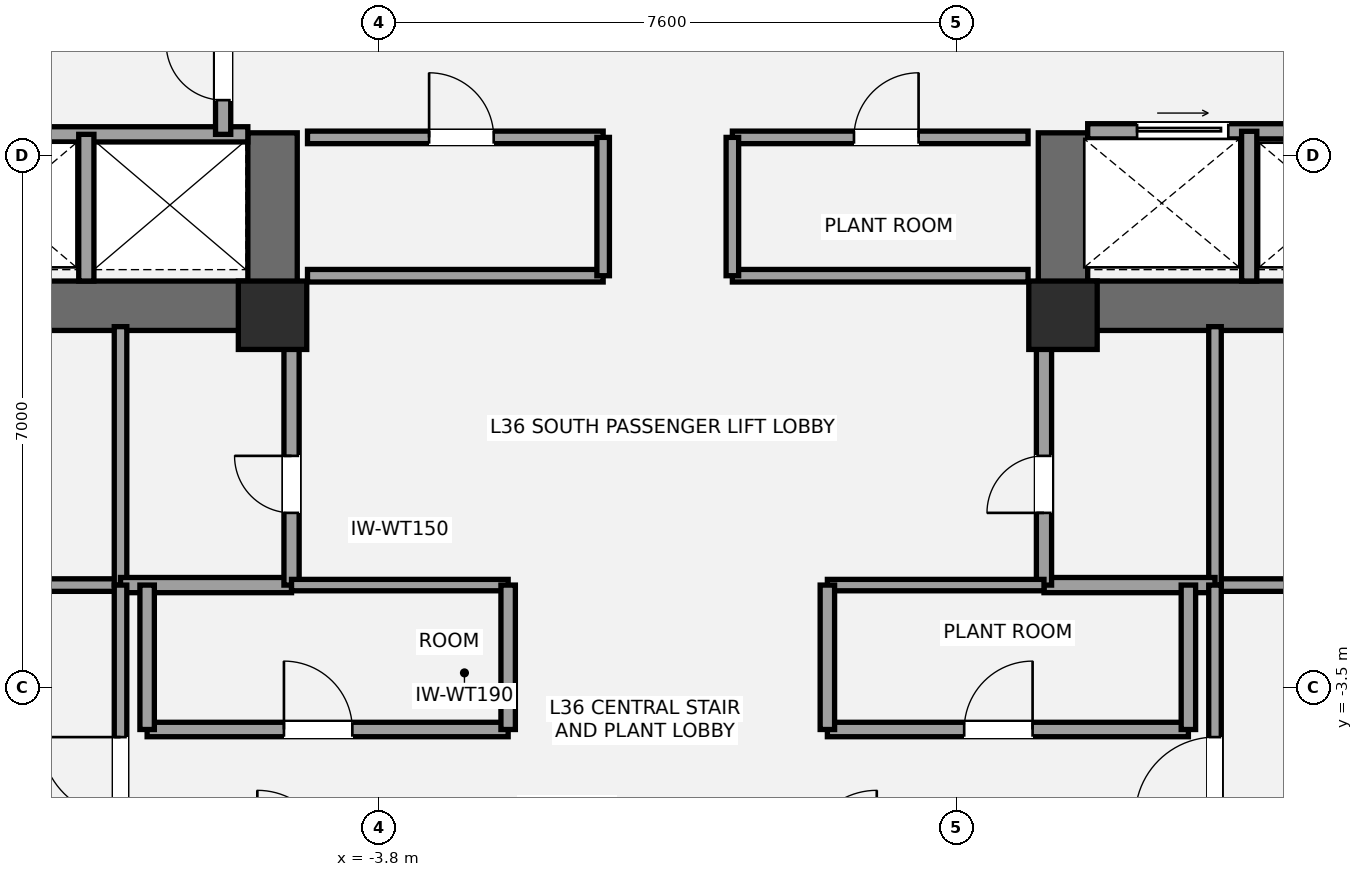
"""IFC4 building model, lengths in metres.
Left out: names, types, materials, properties, quantities, classifications, styles, units other than length and angle.
Written with IfcOpenShell. Run it as: python <this file> out.ifc"""

import sys

from ifc_helpers import new_model, si_unit, direction, frame, frame_2d, origin, origin_2d, place, context, subcontext, project, spatial, rectangle, extrude, element, fill, save


model = new_model("IFC4")
c1 = context("Model", 3, precision=1e-05, world=origin(), true_north=direction((0.0, 1.0)))
c2 = subcontext(c1, "Body", "Model", "MODEL_VIEW")
j1 = project(units=[si_unit("LENGTHUNIT", "METRE"), si_unit("PLANEANGLEUNIT", "RADIAN")], contexts=[c1])
p1 = place(None, origin())
s1 = spatial("IfcSite", under=j1, at=p1, CompositionType="ELEMENT")
p2 = place(p1, origin())
s2 = spatial("IfcBuilding", under=s1, at=p2, CompositionType="ELEMENT")
p3 = place(p2, frame((0.0, 0.0, 135.1)))
s3 = spatial("IfcBuildingStorey", under=s2, at=p3, CompositionType="ELEMENT", Elevation=135.1)
p4 = place(p3, frame((-4.875, 1.525, 0.0), z_axis=(0.0, 0.0, 1.0), x_axis=(-1.0, 0.0, 0.0)))
e1 = element("IfcWall", 1, at=p4, inside=s3, PredefinedType="SHEAR", context=c2, shape_type="SweptSolid", body=[
    extrude(rectangle(XDim=8.925, YDim=0.65, at=frame_2d((4.462, 0.0))), origin(), (0.0, 0.0, 1.0), 4.5),
])
p5 = place(p4, frame((5.305, 0.0, 0.0)))
e2 = element("IfcOpeningElement", 2, at=p5, cuts=e1, PredefinedType="OPENING", context=c2, shape_type="SweptSolid", body=[
    extrude(rectangle(XDim=1.05, YDim=2.15, at=frame_2d((0.525, 1.075))), frame((0.0, 0.335, 0.0), z_axis=(0.0, -1.0, 0.0), x_axis=(1.0, 0.0, 0.0)), (0.0, 0.0, 1.0), 0.67),
])
p6 = place(p4, frame((3.755, 0.0, 0.0)))
e3 = element("IfcOpeningElement", 3, at=p6, cuts=e1, PredefinedType="OPENING", context=c2, shape_type="SweptSolid", body=[
    extrude(rectangle(XDim=1.1, YDim=2.2, at=frame_2d((0.55, 1.1))), frame((0.0, 0.335, 0.0), z_axis=(0.0, -1.0, 0.0), x_axis=(1.0, 0.0, 0.0)), (0.0, 0.0, 1.0), 0.67),
])
p7 = place(p3, frame((-5.2, 1.2, 0.0), z_axis=(0.0, 0.0, 1.0), x_axis=(0.0, 1.0, 0.0)))
e4 = element("IfcWall", 4, at=p7, inside=s3, PredefinedType="SHEAR", context=c2, shape_type="SweptSolid", body=[
    extrude(rectangle(XDim=2.6, YDim=0.65, at=frame_2d((1.3, 0.0))), origin(), (0.0, 0.0, 1.0), 4.5),
])
p8 = place(p3, frame((13.8, 1.525, 0.0), z_axis=(0.0, 0.0, 1.0), x_axis=(-1.0, 0.0, 0.0)))
e5 = element("IfcWall", 5, at=p8, inside=s3, PredefinedType="SHEAR", context=c2, shape_type="SweptSolid", body=[
    extrude(rectangle(XDim=8.925, YDim=0.65, at=frame_2d((4.462, 0.0))), origin(), (0.0, 0.0, 1.0), 4.5),
])
p9 = place(p8, frame((2.57, 0.0, 0.0)))
e6 = element("IfcOpeningElement", 6, at=p9, cuts=e5, PredefinedType="OPENING", context=c2, shape_type="SweptSolid", body=[
    extrude(rectangle(XDim=1.05, YDim=2.15, at=frame_2d((0.525, 1.075))), frame((0.0, 0.335, 0.0), z_axis=(0.0, -1.0, 0.0), x_axis=(1.0, 0.0, 0.0)), (0.0, 0.0, 1.0), 0.67),
])
p10 = place(p8, frame((4.45, 0.0, 0.0)))
e7 = element("IfcOpeningElement", 7, at=p10, cuts=e5, PredefinedType="OPENING", context=c2, shape_type="SweptSolid", body=[
    extrude(rectangle(XDim=1.1, YDim=2.2, at=frame_2d((0.55, 1.1))), frame((0.0, 0.335, 0.0), z_axis=(0.0, -1.0, 0.0), x_axis=(1.0, 0.0, 0.0)), (0.0, 0.0, 1.0), 0.67),
])
p11 = place(p3, frame((5.2, 1.2, 0.0), z_axis=(0.0, 0.0, 1.0), x_axis=(0.0, 1.0, 0.0)))
e8 = element("IfcWall", 8, at=p11, inside=s3, PredefinedType="SHEAR", context=c2, shape_type="SweptSolid", body=[
    extrude(rectangle(XDim=2.6, YDim=0.65, at=frame_2d((1.3, 0.0))), origin(), (0.0, 0.0, 1.0), 4.5),
])
for number, where, z_axis, x_axis in (
    (9, (-5.2, 1.4, 0.0), (0.0, 0.0, 1.0), (1.0, 0.0, 0.0)),
    (10, (5.2, 1.4, 0.0), (0.0, 0.0, 1.0), (1.0, 0.0, 0.0)),
):
    element("IfcColumn", number, at=place(p3, frame(where, z_axis=z_axis, x_axis=x_axis)), inside=s3, PredefinedType="COLUMN", context=c2, shape_type="SweptSolid", body=[
        extrude(rectangle(XDim=0.9, YDim=0.9, at=origin_2d()), origin(), (0.0, 0.0, 1.0), 4.5),
    ])
p12 = place(p3, frame((-13.45, -2.15, 0.0), z_axis=(0.0, 0.0, 1.0), x_axis=(1.0, 0.0, 0.0)))
e11 = element("IfcWall", 11, at=p12, inside=s3, PredefinedType="PARTITIONING", context=c2, shape_type="SweptSolid", body=[
    extrude(rectangle(XDim=6.25, YDim=0.165, at=frame_2d((3.125, 0.0))), origin(), (0.0, 0.0, 1.0), 4.28),
])
p13 = place(p12, frame((2.6, 0.0, 0.0)))
e12 = element("IfcOpeningElement", 12, at=p13, cuts=e11, PredefinedType="OPENING", context=c2, shape_type="SweptSolid", body=[
    extrude(rectangle(XDim=1.05, YDim=2.15, at=frame_2d((0.525, 1.075))), frame((0.0, 0.093, 0.0), z_axis=(0.0, -1.0, 0.0), x_axis=(1.0, 0.0, 0.0)), (0.0, 0.0, 1.0), 0.185),
])
p14 = place(p3, frame((-7.2, -2.15, 0.0), z_axis=(0.0, 0.0, 1.0), x_axis=(0.0, 1.0, 0.0)))
e13 = element("IfcWall", 13, at=p14, inside=s3, PredefinedType="PARTITIONING", context=c2, shape_type="SweptSolid", body=[
    extrude(rectangle(XDim=3.4, YDim=0.165, at=frame_2d((1.7, 0.0))), origin(), (0.0, 0.0, 1.0), 3.733),
])
p15 = place(p3, frame((-7.2, -2.15, 0.0), z_axis=(0.0, 0.0, 1.0), x_axis=(1.0, 0.0, 0.0)))
e14 = element("IfcWall", 14, at=p15, inside=s3, PredefinedType="SOLIDWALL", context=c2, shape_type="SweptSolid", body=[
    extrude(rectangle(XDim=2.25, YDim=0.2, at=frame_2d((1.125, 0.0))), origin(), (0.0, 0.0, 1.0), 2.47),
])
p16 = place(p3, frame((-4.95, -2.15, 0.0), z_axis=(0.0, 0.0, 1.0), x_axis=(0.0, 1.0, 0.0)))
e15 = element("IfcWall", 15, at=p16, inside=s3, PredefinedType="SOLIDWALL", context=c2, shape_type="SweptSolid", body=[
    extrude(rectangle(XDim=3.4, YDim=0.2, at=frame_2d((1.7, 0.0))), origin(), (0.0, 0.0, 1.0), 2.47),
])
p17 = place(p16, frame((0.95, 0.0, 0.0)))
e16 = element("IfcOpeningElement", 16, at=p17, cuts=e15, PredefinedType="OPENING", context=c2, shape_type="SweptSolid", body=[
    extrude(rectangle(XDim=0.75, YDim=2.1, at=frame_2d((0.375, 1.05))), frame((0.0, 0.11, 0.0), z_axis=(0.0, -1.0, 0.0), x_axis=(1.0, 0.0, 0.0)), (0.0, 0.0, 1.0), 0.22),
])
p18 = place(p3, frame((7.2, -2.15, 0.0), z_axis=(0.0, 0.0, 1.0), x_axis=(1.0, 0.0, 0.0)))
e17 = element("IfcWall", 17, at=p18, inside=s3, PredefinedType="PARTITIONING", context=c2, shape_type="SweptSolid", body=[
    extrude(rectangle(XDim=6.25, YDim=0.165, at=frame_2d((3.125, 0.0))), origin(), (0.0, 0.0, 1.0), 4.28),
])
p19 = place(p18, frame((1.4, 0.0, 0.0)))
e18 = element("IfcOpeningElement", 18, at=p19, cuts=e17, PredefinedType="OPENING", context=c2, shape_type="SweptSolid", body=[
    extrude(rectangle(XDim=1.05, YDim=2.15, at=frame_2d((0.525, 1.075))), frame((0.0, 0.093, 0.0), z_axis=(0.0, -1.0, 0.0), x_axis=(1.0, 0.0, 0.0)), (0.0, 0.0, 1.0), 0.185),
])
p20 = place(p3, frame((7.2, -2.15, 0.0), z_axis=(0.0, 0.0, 1.0), x_axis=(0.0, 1.0, 0.0)))
e19 = element("IfcWall", 19, at=p20, inside=s3, PredefinedType="PARTITIONING", context=c2, shape_type="SweptSolid", body=[
    extrude(rectangle(XDim=3.4, YDim=0.165, at=frame_2d((1.7, 0.0))), origin(), (0.0, 0.0, 1.0), 4.28),
])
p21 = place(p3, frame((4.95, -2.15, 0.0), z_axis=(0.0, 0.0, 1.0), x_axis=(1.0, 0.0, 0.0)))
e20 = element("IfcWall", 20, at=p21, inside=s3, PredefinedType="SOLIDWALL", context=c2, shape_type="SweptSolid", body=[
    extrude(rectangle(XDim=2.25, YDim=0.2, at=frame_2d((1.125, 0.0))), origin(), (0.0, 0.0, 1.0), 2.47),
])
p22 = place(p3, frame((4.95, -2.15, 0.0), z_axis=(0.0, 0.0, 1.0), x_axis=(0.0, 1.0, 0.0)))
e21 = element("IfcWall", 21, at=p22, inside=s3, PredefinedType="SOLIDWALL", context=c2, shape_type="SweptSolid", body=[
    extrude(rectangle(XDim=3.4, YDim=0.2, at=frame_2d((1.7, 0.0))), origin(), (0.0, 0.0, 1.0), 2.47),
])
p23 = place(p22, frame((0.95, 0.0, 0.0)))
e22 = element("IfcOpeningElement", 22, at=p23, cuts=e21, PredefinedType="OPENING", context=c2, shape_type="SweptSolid", body=[
    extrude(rectangle(XDim=0.75, YDim=2.1, at=frame_2d((0.375, 1.05))), frame((0.0, 0.11, 0.0), z_axis=(0.0, -1.0, 0.0), x_axis=(1.0, 0.0, 0.0)), (0.0, 0.0, 1.0), 0.22),
])
p24 = place(p3, frame((-9.78, 3.78, 0.0), z_axis=(0.0, 0.0, 1.0), x_axis=(1.0, 0.0, 0.0)))
e23 = element("IfcWall", 23, at=p24, inside=s3, PredefinedType="SOLIDWALL", context=c2, shape_type="SweptSolid", body=[
    extrude(rectangle(XDim=4.255, YDim=0.2, at=frame_2d((2.127, 0.0))), origin(), (0.0, 0.0, 1.0), 4.28),
])
p25 = place(p3, frame((-7.65, 1.85, 0.0), z_axis=(0.0, 0.0, 1.0), x_axis=(0.0, 1.0, 0.0)))
e24 = element("IfcWall", 24, at=p25, inside=s3, PredefinedType="SOLIDWALL", context=c2, shape_type="SweptSolid", body=[
    extrude(rectangle(XDim=1.93, YDim=0.2, at=frame_2d((0.965, 0.0))), origin(), (0.0, 0.0, 1.0), 4.28),
])
p26 = place(p3, frame((-5.85, 3.78, 0.0), z_axis=(0.0, 0.0, 1.0), x_axis=(0.0, 1.0, 0.0)))
e25 = element("IfcWall", 25, at=p26, inside=s3, PredefinedType="SOLIDWALL", context=c2, shape_type="SweptSolid", body=[
    extrude(rectangle(XDim=1.69, YDim=0.2, at=frame_2d((0.845, 0.0))), origin(), (0.0, 0.0, 1.0), 4.28),
])
p27 = place(p26, frame((0.45, 0.0, 0.0)))
e26 = element("IfcOpeningElement", 26, at=p27, cuts=e25, PredefinedType="OPENING", context=c2, shape_type="SweptSolid", body=[
    extrude(rectangle(XDim=0.75, YDim=2.1, at=frame_2d((0.375, 1.05))), frame((0.0, 0.11, 0.0), z_axis=(0.0, -1.0, 0.0), x_axis=(1.0, 0.0, 0.0)), (0.0, 0.0, 1.0), 0.22),
])
p28 = place(p3, frame((5.525, 3.82, 0.0), z_axis=(0.0, 0.0, 1.0), x_axis=(1.0, 0.0, 0.0)))
e27 = element("IfcWall", 27, at=p28, inside=s3, PredefinedType="SOLIDWALL", context=c2, shape_type="SweptSolid", body=[
    extrude(rectangle(XDim=4.255, YDim=0.2, at=frame_2d((2.127, 0.0))), origin(), (0.0, 0.0, 1.0), 4.28),
])
p29 = place(p28, frame((0.65, 0.0, 0.0)))
e28 = element("IfcOpeningElement", 28, at=p29, cuts=e27, PredefinedType="OPENING", context=c2, shape_type="SweptSolid", body=[
    extrude(rectangle(XDim=1.2, YDim=2.2, at=frame_2d((0.6, 1.1))), frame((0.0, 0.11, 0.0), z_axis=(0.0, -1.0, 0.0), x_axis=(1.0, 0.0, 0.0)), (0.0, 0.0, 1.0), 0.22),
])
p30 = place(p3, frame((7.65, 1.85, 0.0), z_axis=(0.0, 0.0, 1.0), x_axis=(0.0, 1.0, 0.0)))
e29 = element("IfcWall", 29, at=p30, inside=s3, PredefinedType="SOLIDWALL", context=c2, shape_type="SweptSolid", body=[
    extrude(rectangle(XDim=1.97, YDim=0.2, at=frame_2d((0.985, 0.0))), origin(), (0.0, 0.0, 1.0), 4.28),
])
p31 = place(p3, frame((-4.74, 1.92, 0.0), z_axis=(0.0, 0.0, 1.0), x_axis=(1.0, 0.0, 0.0)))
e30 = element("IfcWall", 30, at=p31, inside=s3, PredefinedType="PARTITIONING", context=c2, shape_type="SweptSolid", body=[
    extrude(rectangle(XDim=3.89, YDim=0.165, at=frame_2d((1.945, 0.0))), origin(), (0.0, 0.0, 1.0), 3.42),
])
p32 = place(p3, frame((-4.74, 3.74, 0.0), z_axis=(0.0, 0.0, 1.0), x_axis=(1.0, 0.0, 0.0)))
e31 = element("IfcWall", 31, at=p32, inside=s3, PredefinedType="PARTITIONING", context=c2, shape_type="SweptSolid", body=[
    extrude(rectangle(XDim=3.89, YDim=0.165, at=frame_2d((1.945, 0.0))), origin(), (0.0, 0.0, 1.0), 4.28),
])
p33 = place(p32, frame((1.6, 0.0, 0.0)))
e32 = element("IfcOpeningElement", 32, at=p33, cuts=e31, PredefinedType="OPENING", context=c2, shape_type="SweptSolid", body=[
    extrude(rectangle(XDim=0.85, YDim=2.1, at=frame_2d((0.425, 1.05))), frame((0.0, 0.093, 0.0), z_axis=(0.0, -1.0, 0.0), x_axis=(1.0, 0.0, 0.0)), (0.0, 0.0, 1.0), 0.185),
])
p34 = place(p3, frame((-0.85, 1.92, 0.0), z_axis=(0.0, 0.0, 1.0), x_axis=(0.0, 1.0, 0.0)))
e33 = element("IfcWall", 33, at=p34, inside=s3, PredefinedType="PARTITIONING", context=c2, shape_type="SweptSolid", body=[
    extrude(rectangle(XDim=1.82, YDim=0.165, at=frame_2d((0.91, 0.0))), origin(), (0.0, 0.0, 1.0), 4.28),
])
p35 = place(p3, frame((0.85, 1.92, 0.0), z_axis=(0.0, 0.0, 1.0), x_axis=(1.0, 0.0, 0.0)))
e34 = element("IfcWall", 34, at=p35, inside=s3, PredefinedType="PARTITIONING", context=c2, shape_type="SweptSolid", body=[
    extrude(rectangle(XDim=3.89, YDim=0.165, at=frame_2d((1.945, 0.0))), origin(), (0.0, 0.0, 1.0), 3.42),
])
p36 = place(p3, frame((0.85, 3.74, 0.0), z_axis=(0.0, 0.0, 1.0), x_axis=(1.0, 0.0, 0.0)))
e35 = element("IfcWall", 35, at=p36, inside=s3, PredefinedType="PARTITIONING", context=c2, shape_type="SweptSolid", body=[
    extrude(rectangle(XDim=3.89, YDim=0.165, at=frame_2d((1.945, 0.0))), origin(), (0.0, 0.0, 1.0), 4.28),
])
p37 = place(p36, frame((1.6, 0.0, 0.0)))
e36 = element("IfcOpeningElement", 36, at=p37, cuts=e35, PredefinedType="OPENING", context=c2, shape_type="SweptSolid", body=[
    extrude(rectangle(XDim=0.85, YDim=2.1, at=frame_2d((0.425, 1.05))), frame((0.0, 0.093, 0.0), z_axis=(0.0, -1.0, 0.0), x_axis=(1.0, 0.0, 0.0)), (0.0, 0.0, 1.0), 0.185),
])
p38 = place(p3, frame((0.85, 1.92, 0.0), z_axis=(0.0, 0.0, 1.0), x_axis=(0.0, 1.0, 0.0)))
e37 = element("IfcWall", 37, at=p38, inside=s3, PredefinedType="PARTITIONING", context=c2, shape_type="SweptSolid", body=[
    extrude(rectangle(XDim=1.82, YDim=0.165, at=frame_2d((0.91, 0.0))), origin(), (0.0, 0.0, 1.0), 4.28),
])
p39 = place(p3, frame((-6.85, -4.05, 0.0), z_axis=(0.0, 0.0, 1.0), x_axis=(1.0, 0.0, 0.0)))
e38 = element("IfcWall", 38, at=p39, inside=s3, PredefinedType="PLUMBINGWALL", context=c2, shape_type="SweptSolid", body=[
    extrude(rectangle(XDim=4.75, YDim=0.19, at=frame_2d((2.375, 0.0))), origin(), (0.0, 0.0, 1.0), 2.47),
])
p40 = place(p39, frame((1.8, 0.0, 0.0)))
e39 = element("IfcOpeningElement", 39, at=p40, cuts=e38, PredefinedType="OPENING", context=c2, shape_type="SweptSolid", body=[
    extrude(rectangle(XDim=0.9, YDim=2.1, at=frame_2d((0.45, 1.05))), frame((0.0, 0.105, 0.0), z_axis=(0.0, -1.0, 0.0), x_axis=(1.0, 0.0, 0.0)), (0.0, 0.0, 1.0), 0.21),
])
p41 = place(p3, frame((-4.95, -2.15, 0.0), z_axis=(0.0, 0.0, 1.0), x_axis=(1.0, 0.0, 0.0)))
e40 = element("IfcWall", 40, at=p41, inside=s3, PredefinedType="PLUMBINGWALL", context=c2, shape_type="SweptSolid", body=[
    extrude(rectangle(XDim=2.85, YDim=0.15, at=frame_2d((1.425, 0.0))), origin(), (0.0, 0.0, 1.0), 3.733),
])
p42 = place(p3, frame((-6.85, -4.05, 0.0), z_axis=(0.0, 0.0, 1.0), x_axis=(0.0, 1.0, 0.0)))
e41 = element("IfcWall", 41, at=p42, inside=s3, PredefinedType="PLUMBINGWALL", context=c2, shape_type="SweptSolid", body=[
    extrude(rectangle(XDim=1.9, YDim=0.19, at=frame_2d((0.95, 0.0))), origin(), (0.0, 0.0, 1.0), 4.28),
])
p43 = place(p3, frame((-2.1, -4.05, 0.0), z_axis=(0.0, 0.0, 1.0), x_axis=(0.0, 1.0, 0.0)))
e42 = element("IfcWall", 42, at=p43, inside=s3, PredefinedType="PLUMBINGWALL", context=c2, shape_type="SweptSolid", body=[
    extrude(rectangle(XDim=1.9, YDim=0.19, at=frame_2d((0.95, 0.0))), origin(), (0.0, 0.0, 1.0), 3.733),
])
p44 = place(p3, frame((2.1, -4.05, 0.0), z_axis=(0.0, 0.0, 1.0), x_axis=(1.0, 0.0, 0.0)))
e43 = element("IfcWall", 43, at=p44, inside=s3, PredefinedType="PLUMBINGWALL", context=c2, shape_type="SweptSolid", body=[
    extrude(rectangle(XDim=4.75, YDim=0.19, at=frame_2d((2.375, 0.0))), origin(), (0.0, 0.0, 1.0), 2.47),
])
p45 = place(p44, frame((1.8, 0.0, 0.0)))
e44 = element("IfcOpeningElement", 44, at=p45, cuts=e43, PredefinedType="OPENING", context=c2, shape_type="SweptSolid", body=[
    extrude(rectangle(XDim=0.9, YDim=2.1, at=frame_2d((0.45, 1.05))), frame((0.0, 0.105, 0.0), z_axis=(0.0, -1.0, 0.0), x_axis=(1.0, 0.0, 0.0)), (0.0, 0.0, 1.0), 0.21),
])
p46 = place(p3, frame((2.1, -2.15, 0.0), z_axis=(0.0, 0.0, 1.0), x_axis=(1.0, 0.0, 0.0)))
e45 = element("IfcWall", 45, at=p46, inside=s3, PredefinedType="PLUMBINGWALL", context=c2, shape_type="SweptSolid", body=[
    extrude(rectangle(XDim=2.85, YDim=0.15, at=frame_2d((1.425, 0.0))), origin(), (0.0, 0.0, 1.0), 4.28),
])
for number, where, z_axis, x_axis in (
    (46, (2.1, -4.05, 0.0), (0.0, 0.0, 1.0), (0.0, 1.0, 0.0)),
    (47, (6.85, -4.05, 0.0), (0.0, 0.0, 1.0), (0.0, 1.0, 0.0)),
):
    element("IfcWall", number, at=place(p3, frame(where, z_axis=z_axis, x_axis=x_axis)), inside=s3, PredefinedType="PLUMBINGWALL", context=c2, shape_type="SweptSolid", body=[
        extrude(rectangle(XDim=1.9, YDim=0.19, at=frame_2d((0.95, 0.0))), origin(), (0.0, 0.0, 1.0), 4.28),
    ])
p47 = place(p3, frame((-7.2, -5.8, 0.0), z_axis=(0.0, 0.0, 1.0), x_axis=(0.0, 1.0, 0.0)))
e48 = element("IfcWall", 48, at=p47, inside=s3, PredefinedType="PARTITIONING", context=c2, shape_type="SweptSolid", body=[
    extrude(rectangle(XDim=3.65, YDim=0.165, at=frame_2d((1.825, 0.0))), origin(), (0.0, 0.0, 1.0), 3.733),
])
p48 = place(p47, frame((0.6, 0.0, 0.0)))
e49 = element("IfcOpeningElement", 49, at=p48, cuts=e48, PredefinedType="OPENING", context=c2, shape_type="SweptSolid", body=[
    extrude(rectangle(XDim=1.05, YDim=2.15, at=frame_2d((0.525, 1.075))), frame((0.0, 0.093, 0.0), z_axis=(0.0, -1.0, 0.0), x_axis=(1.0, 0.0, 0.0)), (0.0, 0.0, 1.0), 0.185),
])
p49 = place(p3, frame((7.2, -5.8, 0.0), z_axis=(0.0, 0.0, 1.0), x_axis=(0.0, 1.0, 0.0)))
e50 = element("IfcWall", 50, at=p49, inside=s3, PredefinedType="PARTITIONING", context=c2, shape_type="SweptSolid", body=[
    extrude(rectangle(XDim=3.65, YDim=0.165, at=frame_2d((1.825, 0.0))), origin(), (0.0, 0.0, 1.0), 4.28),
])
p50 = place(p49, frame((0.6, 0.0, 0.0)))
e51 = element("IfcOpeningElement", 51, at=p50, cuts=e50, PredefinedType="OPENING", context=c2, shape_type="SweptSolid", body=[
    extrude(rectangle(XDim=1.05, YDim=2.15, at=frame_2d((0.525, 1.075))), frame((0.0, 0.093, 0.0), z_axis=(0.0, -1.0, 0.0), x_axis=(1.0, 0.0, 0.0)), (0.0, 0.0, 1.0), 0.185),
])
p51 = place(p17, origin())
e52 = element("IfcDoor", 52, at=p51, inside=s3, OperationType="SINGLE_SWING_RIGHT", PredefinedType="DOOR", context=c2, shape_type="SweptSolid", body=[
    extrude(rectangle(XDim=0.75, YDim=2.1, at=frame_2d((0.375, 1.05))), frame((0.0, 0.025, 0.0), z_axis=(0.0, -1.0, 0.0), x_axis=(1.0, 0.0, 0.0)), (0.0, 0.0, 1.0), 0.05),
])
fill(e16, e52)
p52 = place(p23, origin())
e53 = element("IfcDoor", 53, at=p52, inside=s3, OperationType="SINGLE_SWING_LEFT", PredefinedType="DOOR", context=c2, shape_type="SweptSolid", body=[
    extrude(rectangle(XDim=0.75, YDim=2.1, at=frame_2d((0.375, 1.05))), frame((0.0, 0.025, 0.0), z_axis=(0.0, -1.0, 0.0), x_axis=(1.0, 0.0, 0.0)), (0.0, 0.0, 1.0), 0.05),
])
fill(e22, e53)
p53 = place(p27, origin())
e54 = element("IfcDoor", 54, at=p53, inside=s3, OperationType="SINGLE_SWING_RIGHT", PredefinedType="DOOR", context=c2, shape_type="SweptSolid", body=[
    extrude(rectangle(XDim=0.75, YDim=2.1, at=frame_2d((0.375, 1.05))), frame((0.0, 0.025, 0.0), z_axis=(0.0, -1.0, 0.0), x_axis=(1.0, 0.0, 0.0)), (0.0, 0.0, 1.0), 0.05),
])
fill(e26, e54)
p54 = place(p29, origin())
e55 = element("IfcDoor", 55, at=p54, inside=s3, OperationType="SLIDING_TO_RIGHT", PredefinedType="DOOR", context=c2, shape_type="SweptSolid", body=[
    extrude(rectangle(XDim=1.2, YDim=2.2, at=frame_2d((0.6, 1.1))), frame((0.0, 0.025, 0.0), z_axis=(0.0, -1.0, 0.0), x_axis=(1.0, 0.0, 0.0)), (0.0, 0.0, 1.0), 0.05),
])
fill(e28, e55)
p55 = place(p33, origin())
e56 = element("IfcDoor", 56, at=p55, inside=s3, OperationType="SINGLE_SWING_LEFT", PredefinedType="DOOR", context=c2, shape_type="SweptSolid", body=[
    extrude(rectangle(XDim=0.85, YDim=2.1, at=frame_2d((0.425, 1.05))), frame((0.0, 0.025, 0.0), z_axis=(0.0, -1.0, 0.0), x_axis=(1.0, 0.0, 0.0)), (0.0, 0.0, 1.0), 0.05),
])
fill(e32, e56)
p56 = place(p37, origin())
e57 = element("IfcDoor", 57, at=p56, inside=s3, OperationType="SINGLE_SWING_RIGHT", PredefinedType="DOOR", context=c2, shape_type="SweptSolid", body=[
    extrude(rectangle(XDim=0.85, YDim=2.1, at=frame_2d((0.425, 1.05))), frame((0.0, 0.025, 0.0), z_axis=(0.0, -1.0, 0.0), x_axis=(1.0, 0.0, 0.0)), (0.0, 0.0, 1.0), 0.05),
])
fill(e36, e57)
p57 = place(p40, origin())
e58 = element("IfcDoor", 58, at=p57, inside=s3, OperationType="SINGLE_SWING_LEFT", PredefinedType="DOOR", context=c2, shape_type="SweptSolid", body=[
    extrude(rectangle(XDim=0.9, YDim=2.1, at=frame_2d((0.45, 1.05))), frame((0.0, 0.025, 0.0), z_axis=(0.0, -1.0, 0.0), x_axis=(1.0, 0.0, 0.0)), (0.0, 0.0, 1.0), 0.05),
])
fill(e39, e58)
p58 = place(p45, origin())
e59 = element("IfcDoor", 59, at=p58, inside=s3, OperationType="SINGLE_SWING_RIGHT", PredefinedType="DOOR", context=c2, shape_type="SweptSolid", body=[
    extrude(rectangle(XDim=0.9, YDim=2.1, at=frame_2d((0.45, 1.05))), frame((0.0, 0.025, 0.0), z_axis=(0.0, -1.0, 0.0), x_axis=(1.0, 0.0, 0.0)), (0.0, 0.0, 1.0), 0.05),
])
fill(e44, e59)
p59 = place(p48, origin())
e60 = element("IfcDoor", 60, at=p59, inside=s3, OperationType="SINGLE_SWING_RIGHT", PredefinedType="DOOR", context=c2, shape_type="SweptSolid", body=[
    extrude(rectangle(XDim=1.05, YDim=2.15, at=frame_2d((0.525, 1.075))), frame((0.0, 0.025, 0.0), z_axis=(0.0, -1.0, 0.0), x_axis=(1.0, 0.0, 0.0)), (0.0, 0.0, 1.0), 0.05),
])
fill(e49, e60)
p60 = place(p50, origin())
e61 = element("IfcDoor", 61, at=p60, inside=s3, OperationType="SINGLE_SWING_LEFT", PredefinedType="DOOR", context=c2, shape_type="SweptSolid", body=[
    extrude(rectangle(XDim=1.05, YDim=2.15, at=frame_2d((0.525, 1.075))), frame((0.0, 0.025, 0.0), z_axis=(0.0, -1.0, 0.0), x_axis=(1.0, 0.0, 0.0)), (0.0, 0.0, 1.0), 0.05),
])
fill(e51, e61)
save(model, sys.argv[1])
